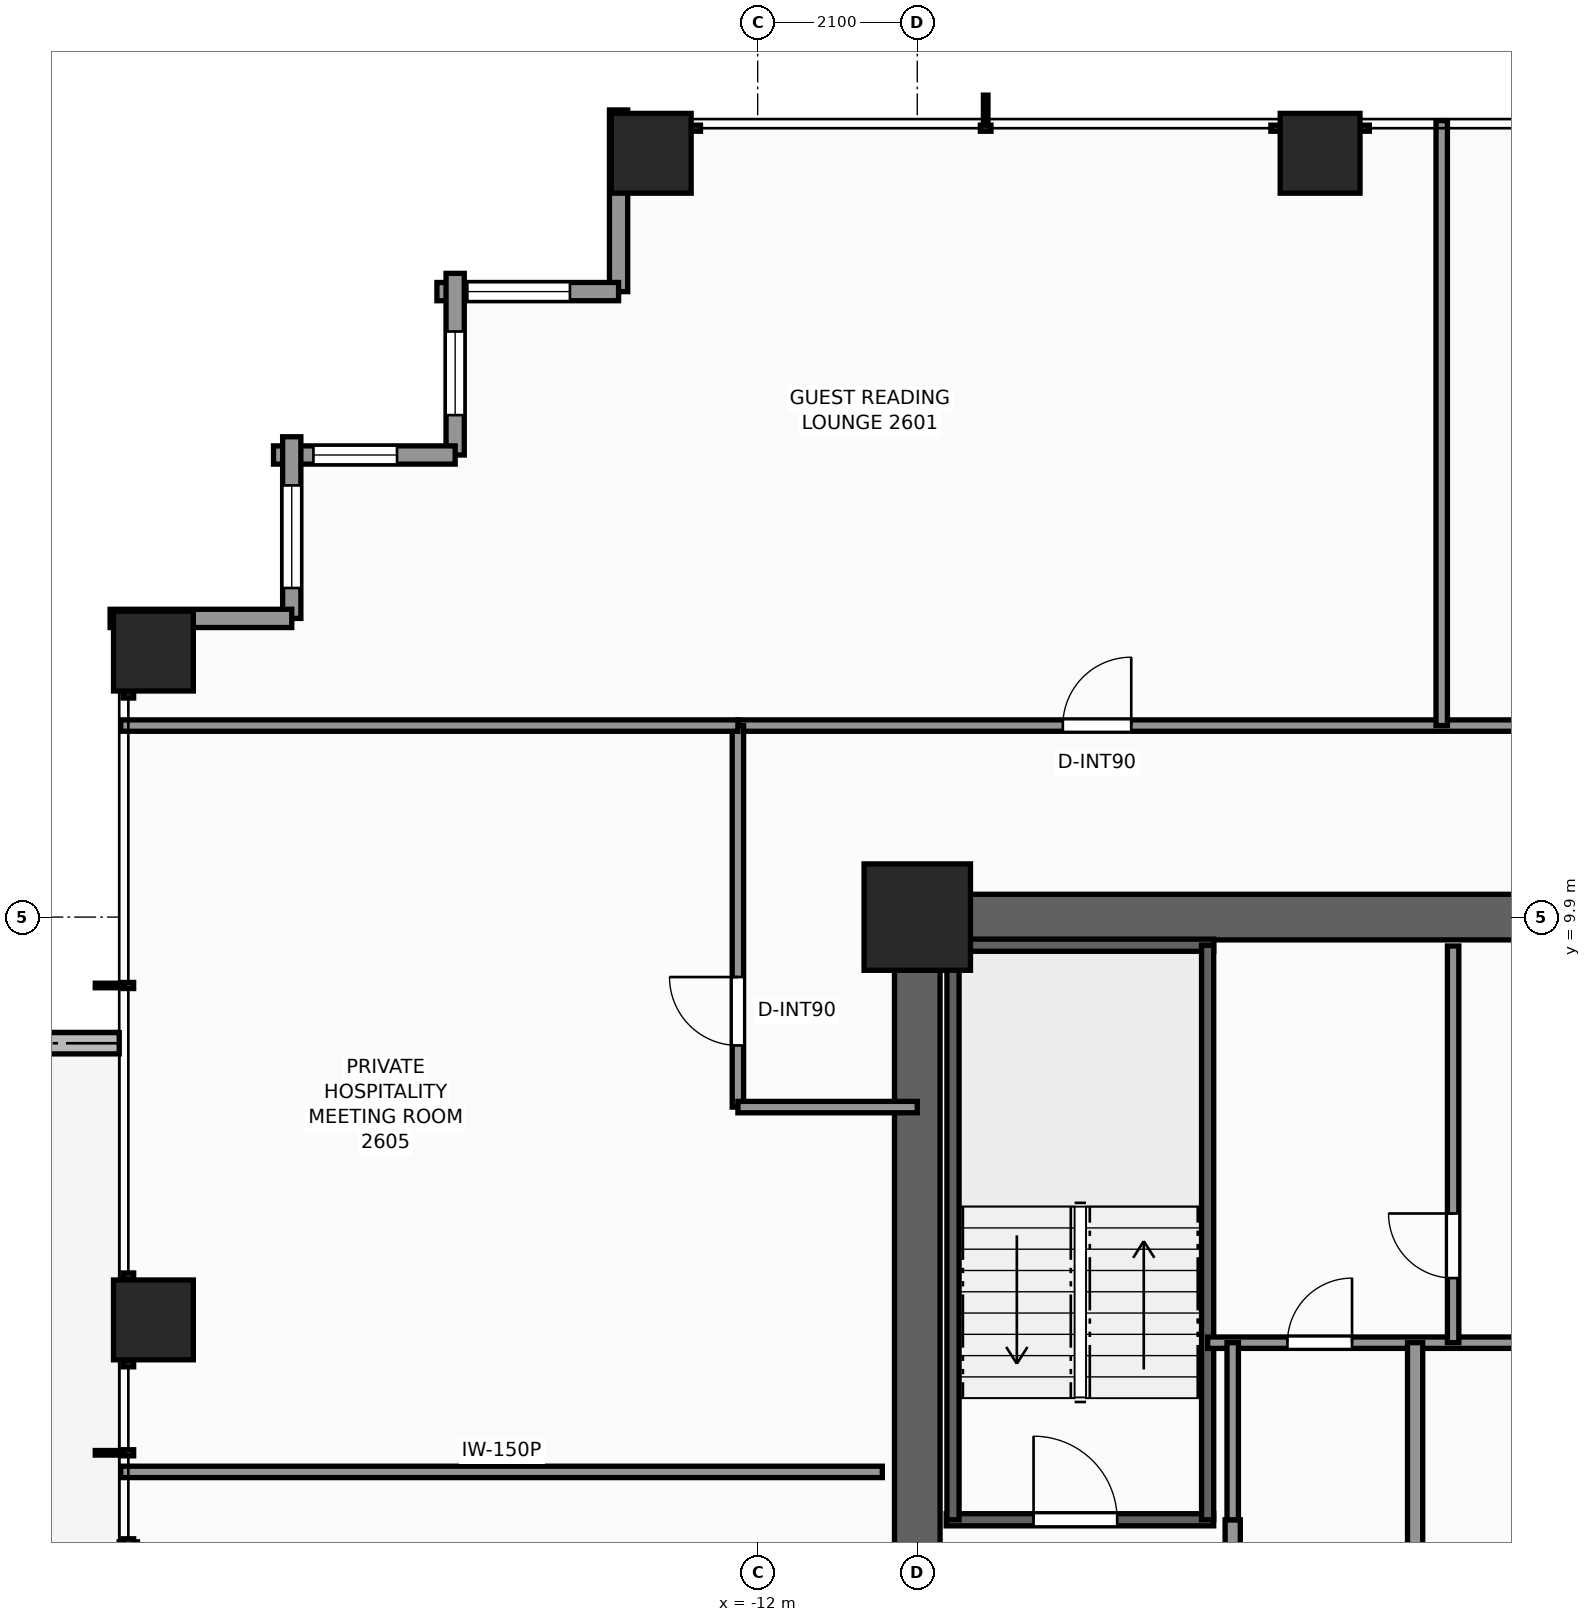
"""IFC4 building model, lengths in metres.
Left out: names, types, materials, properties, quantities, classifications, styles, units other than length and angle.
Written with IfcOpenShell. Run it as: python <this file> out.ifc"""

import sys

from ifc_helpers import new_model, si_unit, direction, frame, frame_2d, origin, origin_2d, place, context, subcontext, project, spatial, rectangle, extrude, element, fill, save


model = new_model("IFC4")
c1 = context("Model", 3, precision=1e-05, world=origin(), true_north=direction((0.0, 1.0)))
c2 = subcontext(c1, "Body", "Model", "MODEL_VIEW")
j1 = project(units=[si_unit("LENGTHUNIT", "METRE"), si_unit("PLANEANGLEUNIT", "RADIAN")], contexts=[c1])
p1 = place(None, origin())
s1 = spatial("IfcSite", under=j1, at=p1, CompositionType="ELEMENT")
p2 = place(p1, origin())
s2 = spatial("IfcBuilding", under=s1, at=p2, CompositionType="ELEMENT")
p3 = place(p2, frame((0.0, 0.0, 92.0)))
s3 = spatial("IfcBuildingStorey", under=s2, at=p3, CompositionType="ELEMENT", Elevation=92.0)
p4 = place(p3, frame((-10.2, 9.9, 0.0), z_axis=(0.0, 0.0, 1.0), x_axis=(1.0, 0.0, 0.0)))
e1 = element("IfcWall", 1, at=p4, inside=s3, PredefinedType="SHEAR", context=c2, shape_type="SweptSolid", body=[
    extrude(rectangle(XDim=14.62, YDim=0.6, at=frame_2d((7.31, 0.0))), origin(), (0.0, 0.0, 1.0), 3.3),
])
p5 = place(p3, frame((-9.9, -3.7, 0.0), z_axis=(0.0, 0.0, 1.0), x_axis=(0.0, 1.0, 0.0)))
e2 = element("IfcWall", 2, at=p5, inside=s3, PredefinedType="SHEAR", context=c2, shape_type="SweptSolid", body=[
    extrude(rectangle(XDim=13.3, YDim=0.6, at=frame_2d((6.65, 0.0))), origin(), (0.0, 0.0, 1.0), 3.3),
])
p6 = place(p5, frame((0.35, 0.0, 0.0)))
e3 = element("IfcOpeningElement", 3, at=p6, cuts=e2, PredefinedType="OPENING", context=c2, shape_type="SweptSolid", body=[
    extrude(rectangle(XDim=1.1, YDim=2.2, at=frame_2d((0.55, 1.1))), frame((0.0, 0.31, 0.0), z_axis=(0.0, -1.0, 0.0), x_axis=(1.0, 0.0, 0.0)), (0.0, 0.0, 1.0), 0.62),
])
p7 = place(p3, frame((-9.9, 9.9, 0.0), z_axis=(0.0, 0.0, 1.0), x_axis=(1.0, 0.0, 0.0)))
e4 = element("IfcColumn", 4, at=p7, inside=s3, PredefinedType="COLUMN", context=c2, shape_type="SweptSolid", body=[
    extrude(rectangle(XDim=1.4, YDim=1.4, at=origin_2d()), origin(), (0.0, 0.0, 1.0), 3.3),
])
for number, where, z_axis, x_axis in (
    (5, (-13.4, 19.95, 0.0), (0.0, 0.0, 1.0), (1.0, 0.0, 0.0)),
    (6, (-4.6, 19.95, 0.0), (0.0, 0.0, 1.0), (1.0, 0.0, 0.0)),
    (7, (-19.95, 4.6, 0.0), (0.0, 0.0, 1.0), (1.0, 0.0, 0.0)),
    (8, (-19.95, 13.4, 0.0), (0.0, 0.0, 1.0), (1.0, 0.0, 0.0)),
):
    element("IfcColumn", number, at=place(p3, frame(where, z_axis=z_axis, x_axis=x_axis)), inside=s3, PredefinedType="COLUMN", context=c2, shape_type="SweptSolid", body=[
        extrude(rectangle(XDim=1.05, YDim=1.05, at=origin_2d()), origin(), (0.0, 0.0, 1.0), 3.3),
    ])
p8 = place(p3, frame((-20.4, 8.24, -0.04), z_axis=(0.0, 0.0, 1.0), x_axis=(-1.0, 0.0, 0.0)))
e9 = element("IfcWall", 9, at=p8, inside=s3, PredefinedType="PARAPET", context=c2, shape_type="SweptSolid", body=[
    extrude(rectangle(XDim=2.006, YDim=0.28, at=frame_2d((1.003, 0.0))), origin(), (0.0, 0.0, 1.0), 0.42),
])
p9 = place(p3, frame((-13.83, 18.13, 0.0), z_axis=(0.0, 0.0, 1.0), x_axis=(0.0, 1.0, 0.0)))
e10 = element("IfcWall", 10, at=p9, inside=s3, PredefinedType="STANDARD", context=c2, shape_type="SweptSolid", body=[
    extrude(rectangle(XDim=2.39, YDim=0.24, at=frame_2d((1.195, 0.0))), origin(), (0.0, 0.0, 1.0), 2.459),
])
p10 = place(p3, frame((-16.22, 18.13, 0.0), z_axis=(0.0, 0.0, 1.0), x_axis=(1.0, 0.0, 0.0)))
e11 = element("IfcWall", 11, at=p10, inside=s3, PredefinedType="STANDARD", context=c2, shape_type="SweptSolid", body=[
    extrude(rectangle(XDim=2.39, YDim=0.24, at=frame_2d((1.195, 0.0))), origin(), (0.0, 0.0, 1.0), 2.459),
])
p11 = place(p10, frame((0.4, 0.0, 0.65)))
e12 = element("IfcOpeningElement", 12, at=p11, cuts=e11, PredefinedType="OPENING", context=c2, shape_type="SweptSolid", body=[
    extrude(rectangle(XDim=1.35, YDim=1.55, at=frame_2d((0.675, 0.775))), frame((0.0, 0.13, 0.0), z_axis=(0.0, -1.0, 0.0), x_axis=(1.0, 0.0, 0.0)), (0.0, 0.0, 1.0), 0.26),
])
p12 = place(p3, frame((-15.98, 15.98, 0.0), z_axis=(0.0, 0.0, 1.0), x_axis=(0.0, 1.0, 0.0)))
e13 = element("IfcWall", 13, at=p12, inside=s3, PredefinedType="STANDARD", context=c2, shape_type="SweptSolid", body=[
    extrude(rectangle(XDim=2.39, YDim=0.24, at=frame_2d((1.195, 0.0))), origin(), (0.0, 0.0, 1.0), 2.459),
])
p13 = place(p12, frame((0.525, 0.0, 0.65)))
e14 = element("IfcOpeningElement", 14, at=p13, cuts=e13, PredefinedType="OPENING", context=c2, shape_type="SweptSolid", body=[
    extrude(rectangle(XDim=1.1, YDim=1.45, at=frame_2d((0.55, 0.725))), frame((0.0, 0.13, 0.0), z_axis=(0.0, -1.0, 0.0), x_axis=(1.0, 0.0, 0.0)), (0.0, 0.0, 1.0), 0.26),
])
p14 = place(p3, frame((-18.37, 15.98, 0.0), z_axis=(0.0, 0.0, 1.0), x_axis=(1.0, 0.0, 0.0)))
e15 = element("IfcWall", 15, at=p14, inside=s3, PredefinedType="STANDARD", context=c2, shape_type="SweptSolid", body=[
    extrude(rectangle(XDim=2.39, YDim=0.24, at=frame_2d((1.195, 0.0))), origin(), (0.0, 0.0, 1.0), 2.459),
])
p15 = place(p14, frame((0.525, 0.0, 0.65)))
e16 = element("IfcOpeningElement", 16, at=p15, cuts=e15, PredefinedType="OPENING", context=c2, shape_type="SweptSolid", body=[
    extrude(rectangle(XDim=1.1, YDim=1.45, at=frame_2d((0.55, 0.725))), frame((0.0, 0.13, 0.0), z_axis=(0.0, -1.0, 0.0), x_axis=(1.0, 0.0, 0.0)), (0.0, 0.0, 1.0), 0.26),
])
p16 = place(p3, frame((-18.13, 13.83, 0.0), z_axis=(0.0, 0.0, 1.0), x_axis=(0.0, 1.0, 0.0)))
e17 = element("IfcWall", 17, at=p16, inside=s3, PredefinedType="STANDARD", context=c2, shape_type="SweptSolid", body=[
    extrude(rectangle(XDim=2.39, YDim=0.24, at=frame_2d((1.195, 0.0))), origin(), (0.0, 0.0, 1.0), 2.459),
])
p17 = place(p16, frame((0.4, 0.0, 0.65)))
e18 = element("IfcOpeningElement", 18, at=p17, cuts=e17, PredefinedType="OPENING", context=c2, shape_type="SweptSolid", body=[
    extrude(rectangle(XDim=1.35, YDim=1.55, at=frame_2d((0.675, 0.775))), frame((0.0, 0.13, 0.0), z_axis=(0.0, -1.0, 0.0), x_axis=(1.0, 0.0, 0.0)), (0.0, 0.0, 1.0), 0.26),
])
p18 = place(p3, frame((-20.52, 13.83, 0.0), z_axis=(0.0, 0.0, 1.0), x_axis=(1.0, 0.0, 0.0)))
e19 = element("IfcWall", 19, at=p18, inside=s3, PredefinedType="STANDARD", context=c2, shape_type="SweptSolid", body=[
    extrude(rectangle(XDim=2.39, YDim=0.24, at=frame_2d((1.195, 0.0))), origin(), (0.0, 0.0, 1.0), 2.459),
])
p19 = place(p3, frame((-9.52, 1.97, 0.0), z_axis=(0.0, 0.0, 1.0), x_axis=(1.0, 0.0, 0.0)))
e20 = element("IfcWall", 20, at=p19, inside=s3, PredefinedType="SHEAR", context=c2, shape_type="SweptSolid", body=[
    extrude(rectangle(XDim=3.52, YDim=0.16, at=frame_2d((1.76, 0.0))), origin(), (0.0, 0.0, 1.0), 3.3),
])
p20 = place(p19, frame((1.15, 0.0, 0.0)))
e21 = element("IfcOpeningElement", 21, at=p20, cuts=e20, PredefinedType="OPENING", context=c2, shape_type="SweptSolid", body=[
    extrude(rectangle(XDim=1.1, YDim=2.2, at=frame_2d((0.55, 1.1))), frame((0.0, 0.09, 0.0), z_axis=(0.0, -1.0, 0.0), x_axis=(1.0, 0.0, 0.0)), (0.0, 0.0, 1.0), 0.18),
])
p21 = place(p3, frame((-9.52, 9.53, 0.0), z_axis=(0.0, 0.0, 1.0), x_axis=(1.0, 0.0, 0.0)))
e22 = element("IfcWall", 22, at=p21, inside=s3, PredefinedType="SHEAR", context=c2, shape_type="SweptSolid", body=[
    extrude(rectangle(XDim=3.52, YDim=0.16, at=frame_2d((1.76, 0.0))), origin(), (0.0, 0.0, 1.0), 3.3),
])
for number, where, z_axis, x_axis in (
    (23, (-9.43, 1.97, 0.0), (0.0, 0.0, 1.0), (0.0, 1.0, 0.0)),
    (24, (-6.08, 1.97, 0.0), (0.0, 0.0, 1.0), (0.0, 1.0, 0.0)),
):
    element("IfcWall", number, at=place(p3, frame(where, z_axis=z_axis, x_axis=x_axis)), inside=s3, PredefinedType="SHEAR", context=c2, shape_type="SweptSolid", body=[
        extrude(rectangle(XDim=7.56, YDim=0.16, at=frame_2d((3.78, 0.0))), origin(), (0.0, 0.0, 1.0), 3.3),
    ])
p22 = place(p3, frame((-5.75, -3.6, 0.0), z_axis=(0.0, 0.0, 1.0), x_axis=(0.0, 1.0, 0.0)))
e25 = element("IfcWall", 25, at=p22, inside=s3, PredefinedType="SOLIDWALL", context=c2, shape_type="SweptSolid", body=[
    extrude(rectangle(XDim=5.57, YDim=0.2, at=frame_2d((2.785, 0.0))), origin(), (0.0, 0.0, 1.0), 3.08),
])
p23 = place(p22, frame((2.75, 0.0, 0.0)))
e26 = element("IfcOpeningElement", 26, at=p23, cuts=e25, PredefinedType="OPENING", context=c2, shape_type="SweptSolid", body=[
    extrude(rectangle(XDim=1.1, YDim=2.2, at=frame_2d((0.55, 1.1))), frame((0.0, 0.11, 0.0), z_axis=(0.0, -1.0, 0.0), x_axis=(1.0, 0.0, 0.0)), (0.0, 0.0, 1.0), 0.22),
])
p24 = place(p3, frame((-6.08, 4.3, 0.0), z_axis=(0.0, 0.0, 1.0), x_axis=(1.0, 0.0, 0.0)))
e27 = element("IfcWall", 27, at=p24, inside=s3, PredefinedType="PARTITIONING", context=c2, shape_type="SweptSolid", body=[
    extrude(rectangle(XDim=6.3, YDim=0.15, at=frame_2d((3.15, 0.0))), origin(), (0.0, 0.0, 1.0), 3.08),
])
p25 = place(p24, frame((1.05, 0.0, 0.0)))
e28 = element("IfcOpeningElement", 28, at=p25, cuts=e27, PredefinedType="OPENING", context=c2, shape_type="SweptSolid", body=[
    extrude(rectangle(XDim=0.85, YDim=2.03, at=frame_2d((0.425, 1.015))), frame((0.0, 0.085, 0.0), z_axis=(0.0, -1.0, 0.0), x_axis=(1.0, 0.0, 0.0)), (0.0, 0.0, 1.0), 0.17),
])
p26 = place(p3, frame((-2.85, 4.3, 0.0), z_axis=(0.0, 0.0, 1.0), x_axis=(0.0, 1.0, 0.0)))
e29 = element("IfcWall", 29, at=p26, inside=s3, PredefinedType="PARTITIONING", context=c2, shape_type="SweptSolid", body=[
    extrude(rectangle(XDim=5.22, YDim=0.15, at=frame_2d((2.61, 0.0))), origin(), (0.0, 0.0, 1.0), 3.08),
])
p27 = place(p26, frame((0.85, 0.0, 0.0)))
e30 = element("IfcOpeningElement", 30, at=p27, cuts=e29, PredefinedType="OPENING", context=c2, shape_type="SweptSolid", body=[
    extrude(rectangle(XDim=0.85, YDim=2.03, at=frame_2d((0.425, 1.015))), frame((0.0, 0.085, 0.0), z_axis=(0.0, -1.0, 0.0), x_axis=(1.0, 0.0, 0.0)), (0.0, 0.0, 1.0), 0.17),
])
p28 = place(p3, frame((-3.35, 1.1, 0.0), z_axis=(0.0, 0.0, 1.0), x_axis=(0.0, 1.0, 0.0)))
e31 = element("IfcWall", 31, at=p28, inside=s3, PredefinedType="SOLIDWALL", context=c2, shape_type="SweptSolid", body=[
    extrude(rectangle(XDim=3.2, YDim=0.2, at=frame_2d((1.6, 0.0))), origin(), (0.0, 0.0, 1.0), 3.08),
])
p29 = place(p3, frame((-5.75, 1.97, 0.0), z_axis=(0.0, 0.0, 1.0), x_axis=(0.0, 1.0, 0.0)))
e32 = element("IfcWall", 32, at=p29, inside=s3, PredefinedType="PARTITIONING", context=c2, shape_type="SweptSolid", body=[
    extrude(rectangle(XDim=2.33, YDim=0.15, at=frame_2d((1.165, 0.0))), origin(), (0.0, 0.0, 1.0), 3.08),
])
p30 = place(p3, frame((-12.26, 12.42, 0.0), z_axis=(0.0, 0.0, 1.0), x_axis=(1.0, 0.0, 0.0)))
e33 = element("IfcWall", 33, at=p30, inside=s3, PredefinedType="PARTITIONING", context=c2, shape_type="SweptSolid", body=[
    extrude(rectangle(XDim=24.68, YDim=0.15, at=frame_2d((12.34, 0.0))), origin(), (0.0, 0.0, 1.0), 2.292),
])
p31 = place(p30, frame((4.275, 0.0, 0.0)))
e34 = element("IfcOpeningElement", 34, at=p31, cuts=e33, PredefinedType="OPENING", context=c2, shape_type="SweptSolid", body=[
    extrude(rectangle(XDim=0.9, YDim=2.06, at=frame_2d((0.45, 1.03))), frame((0.0, 0.085, 0.0), z_axis=(0.0, -1.0, 0.0), x_axis=(1.0, 0.0, 0.0)), (0.0, 0.0, 1.0), 0.17),
])
p32 = place(p30, frame((19.345, 0.0, 0.0)))
e35 = element("IfcOpeningElement", 35, at=p32, cuts=e33, PredefinedType="OPENING", context=c2, shape_type="SweptSolid", body=[
    extrude(rectangle(XDim=0.9, YDim=2.06, at=frame_2d((0.45, 1.03))), frame((0.0, 0.085, 0.0), z_axis=(0.0, -1.0, 0.0), x_axis=(1.0, 0.0, 0.0)), (0.0, 0.0, 1.0), 0.17),
])
p33 = place(p3, frame((-12.26, 7.4, 0.0), z_axis=(0.0, 0.0, 1.0), x_axis=(0.0, 1.0, 0.0)))
e36 = element("IfcWall", 36, at=p33, inside=s3, PredefinedType="PARTITIONING", context=c2, shape_type="SweptSolid", body=[
    extrude(rectangle(XDim=5.02, YDim=0.15, at=frame_2d((2.51, 0.0))), origin(), (0.0, 0.0, 1.0), 2.292),
])
p34 = place(p33, frame((0.811, 0.0, 0.0)))
e37 = element("IfcOpeningElement", 37, at=p34, cuts=e36, PredefinedType="OPENING", context=c2, shape_type="SweptSolid", body=[
    extrude(rectangle(XDim=0.9, YDim=2.06, at=frame_2d((0.45, 1.03))), frame((0.0, 0.085, 0.0), z_axis=(0.0, -1.0, 0.0), x_axis=(1.0, 0.0, 0.0)), (0.0, 0.0, 1.0), 0.17),
])
p35 = place(p3, frame((-12.26, 7.4, 0.0), z_axis=(0.0, 0.0, 1.0), x_axis=(1.0, 0.0, 0.0)))
e38 = element("IfcWall", 38, at=p35, inside=s3, PredefinedType="PARTITIONING", context=c2, shape_type="SweptSolid", body=[
    extrude(rectangle(XDim=2.36, YDim=0.15, at=frame_2d((1.18, 0.0))), origin(), (0.0, 0.0, 1.0), 3.08),
])
p36 = place(p3, frame((-20.38, 12.42, 0.0), z_axis=(0.0, 0.0, 1.0), x_axis=(1.0, 0.0, 0.0)))
e39 = element("IfcWall", 39, at=p36, inside=s3, PredefinedType="PARTITIONING", context=c2, shape_type="SweptSolid", body=[
    extrude(rectangle(XDim=8.12, YDim=0.15, at=frame_2d((4.06, 0.0))), origin(), (0.0, 0.0, 1.0), 2.292),
])
p37 = place(p3, frame((-3.0, 12.42, 0.0), z_axis=(0.0, 0.0, 1.0), x_axis=(0.0, 1.0, 0.0)))
e40 = element("IfcWall", 40, at=p37, inside=s3, PredefinedType="PARTITIONING", context=c2, shape_type="SweptSolid", body=[
    extrude(rectangle(XDim=7.96, YDim=0.15, at=frame_2d((3.98, 0.0))), origin(), (0.0, 0.0, 1.0), 2.449),
])
p38 = place(p3, frame((-20.38, 2.6, 0.0), z_axis=(0.0, 0.0, 1.0), x_axis=(1.0, 0.0, 0.0)))
e41 = element("IfcWall", 41, at=p38, inside=s3, PredefinedType="PARTITIONING", context=c2, shape_type="SweptSolid", body=[
    extrude(rectangle(XDim=10.02, YDim=0.15, at=frame_2d((5.01, 0.0))), origin(), (0.0, 0.0, 1.0), 2.449),
])
p39 = place(p11, origin())
e42 = element("IfcWindow", 42, at=p39, inside=s3, PartitioningType="SINGLE_PANEL", PredefinedType="WINDOW", context=c2, shape_type="SweptSolid", body=[
    extrude(rectangle(XDim=1.35, YDim=1.55, at=frame_2d((0.675, 0.775))), frame((0.0, 0.03, 0.0), z_axis=(0.0, -1.0, 0.0), x_axis=(1.0, 0.0, 0.0)), (0.0, 0.0, 1.0), 0.06),
])
fill(e12, e42)
p40 = place(p13, origin())
e43 = element("IfcWindow", 43, at=p40, inside=s3, PartitioningType="SINGLE_PANEL", PredefinedType="WINDOW", context=c2, shape_type="SweptSolid", body=[
    extrude(rectangle(XDim=1.1, YDim=1.45, at=frame_2d((0.55, 0.725))), frame((0.0, 0.03, 0.0), z_axis=(0.0, -1.0, 0.0), x_axis=(1.0, 0.0, 0.0)), (0.0, 0.0, 1.0), 0.06),
])
fill(e14, e43)
p41 = place(p15, origin())
e44 = element("IfcWindow", 44, at=p41, inside=s3, PartitioningType="SINGLE_PANEL", PredefinedType="WINDOW", context=c2, shape_type="SweptSolid", body=[
    extrude(rectangle(XDim=1.1, YDim=1.45, at=frame_2d((0.55, 0.725))), frame((0.0, 0.03, 0.0), z_axis=(0.0, -1.0, 0.0), x_axis=(1.0, 0.0, 0.0)), (0.0, 0.0, 1.0), 0.06),
])
fill(e16, e44)
p42 = place(p17, origin())
e45 = element("IfcWindow", 45, at=p42, inside=s3, PartitioningType="SINGLE_PANEL", PredefinedType="WINDOW", context=c2, shape_type="SweptSolid", body=[
    extrude(rectangle(XDim=1.35, YDim=1.55, at=frame_2d((0.675, 0.775))), frame((0.0, 0.03, 0.0), z_axis=(0.0, -1.0, 0.0), x_axis=(1.0, 0.0, 0.0)), (0.0, 0.0, 1.0), 0.06),
])
fill(e18, e45)
p43 = place(p20, origin())
e46 = element("IfcDoor", 46, at=p43, inside=s3, OperationType="SINGLE_SWING_LEFT", PredefinedType="DOOR", context=c2, shape_type="SweptSolid", body=[
    extrude(rectangle(XDim=1.1, YDim=2.2, at=frame_2d((0.55, 1.1))), frame((0.0, 0.025, 0.0), z_axis=(0.0, -1.0, 0.0), x_axis=(1.0, 0.0, 0.0)), (0.0, 0.0, 1.0), 0.05),
])
fill(e21, e46)
p44 = place(p27, origin())
e47 = element("IfcDoor", 47, at=p44, inside=s3, OperationType="SINGLE_SWING_RIGHT", PredefinedType="DOOR", context=c2, shape_type="SweptSolid", body=[
    extrude(rectangle(XDim=0.85, YDim=2.03, at=frame_2d((0.425, 1.015))), frame((0.0, 0.025, 0.0), z_axis=(0.0, -1.0, 0.0), x_axis=(1.0, 0.0, 0.0)), (0.0, 0.0, 1.0), 0.05),
])
fill(e30, e47)
p45 = place(p25, origin())
e48 = element("IfcDoor", 48, at=p45, inside=s3, OperationType="SINGLE_SWING_RIGHT", PredefinedType="DOOR", context=c2, shape_type="SweptSolid", body=[
    extrude(rectangle(XDim=0.85, YDim=2.03, at=frame_2d((0.425, 1.015))), frame((0.0, 0.025, 0.0), z_axis=(0.0, -1.0, 0.0), x_axis=(1.0, 0.0, 0.0)), (0.0, 0.0, 1.0), 0.05),
])
fill(e28, e48)
p46 = place(p31, origin())
e49 = element("IfcDoor", 49, at=p46, inside=s3, OperationType="SINGLE_SWING_RIGHT", PredefinedType="DOOR", context=c2, shape_type="SweptSolid", body=[
    extrude(rectangle(XDim=0.9, YDim=2.06, at=frame_2d((0.45, 1.03))), frame((0.0, 0.025, 0.0), z_axis=(0.0, -1.0, 0.0), x_axis=(1.0, 0.0, 0.0)), (0.0, 0.0, 1.0), 0.05),
])
fill(e34, e49)
p47 = place(p34, origin())
e50 = element("IfcDoor", 50, at=p47, inside=s3, OperationType="SINGLE_SWING_RIGHT", PredefinedType="DOOR", context=c2, shape_type="SweptSolid", body=[
    extrude(rectangle(XDim=0.9, YDim=2.06, at=frame_2d((0.45, 1.03))), frame((0.0, 0.025, 0.0), z_axis=(0.0, -1.0, 0.0), x_axis=(1.0, 0.0, 0.0)), (0.0, 0.0, 1.0), 0.05),
])
fill(e37, e50)
save(model, sys.argv[1])
